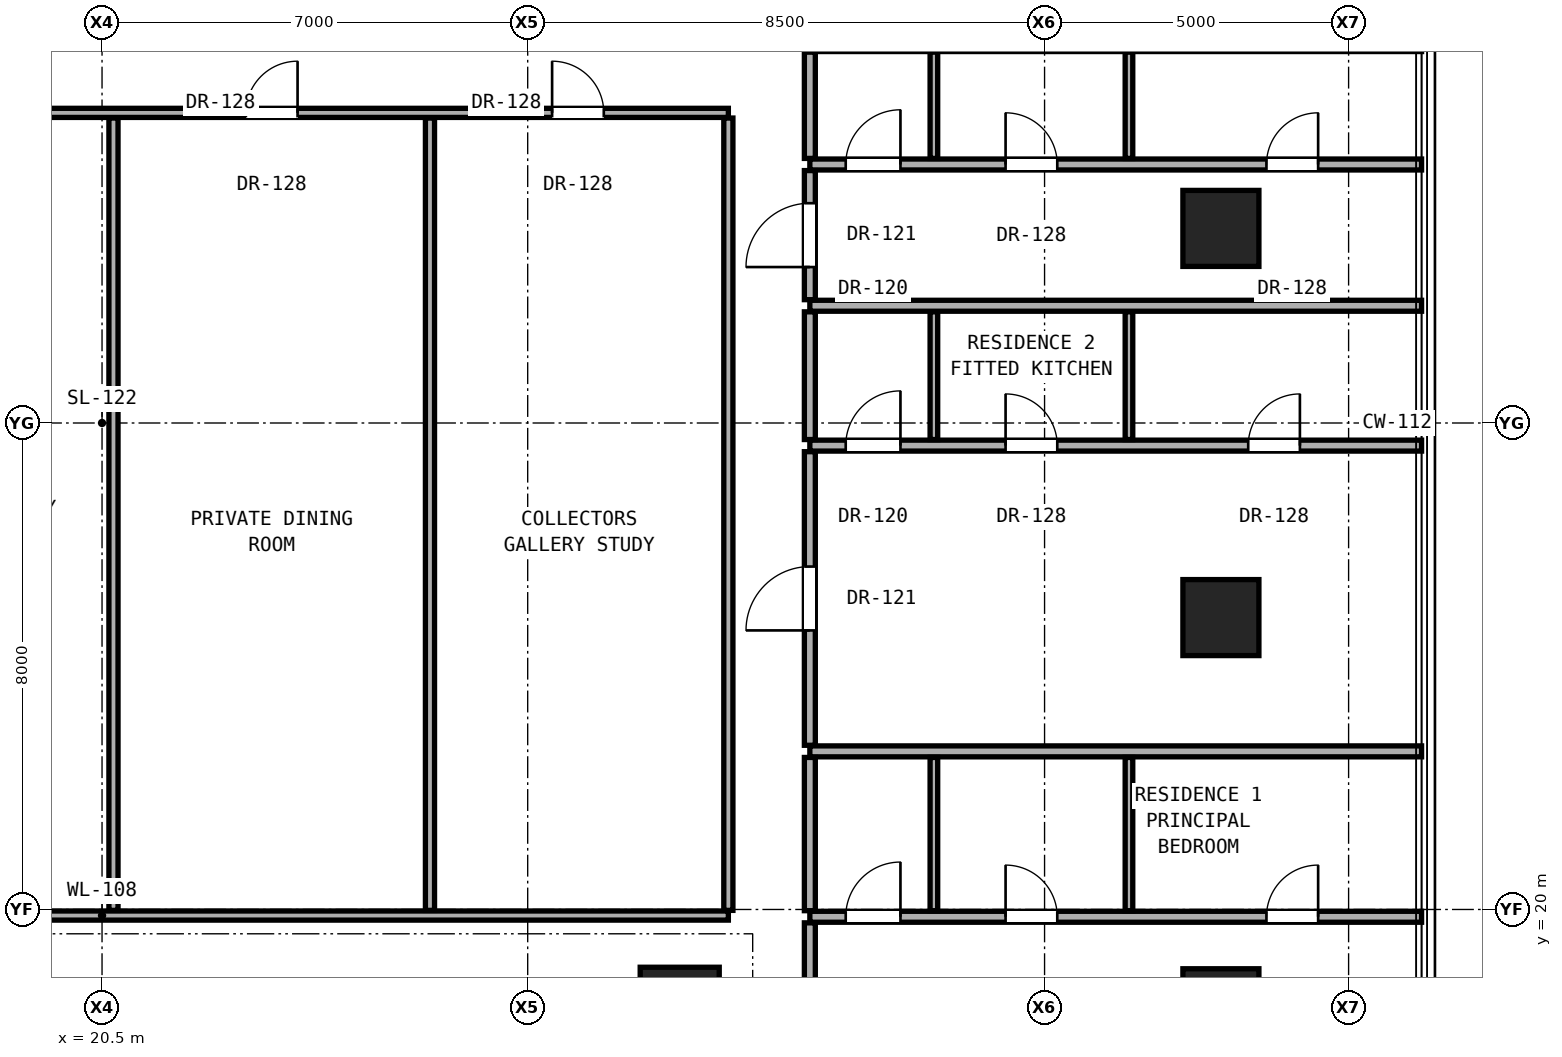
"""IFC4 building model, lengths in metres.
Left out: names, types, materials, properties, quantities, classifications, styles, units other than length and angle.
Written with IfcOpenShell. Run it as: python <this file> out.ifc"""

import sys

from ifc_helpers import new_model, si_unit, direction, frame, frame_2d, origin, origin_2d, place, context, subcontext, project, spatial, rectangle, hollow_rectangle, extrude, element, fill, save


model = new_model("IFC4")
c1 = context("Model", 3, precision=1e-05, world=origin(), true_north=direction((0.0, 1.0)))
c2 = subcontext(c1, "Body", "Model", "MODEL_VIEW")
j1 = project(units=[si_unit("LENGTHUNIT", "METRE"), si_unit("PLANEANGLEUNIT", "RADIAN")], contexts=[c1])
p1 = place(None, origin())
s1 = spatial("IfcSite", under=j1, at=p1, CompositionType="ELEMENT")
p2 = place(p1, origin())
s2 = spatial("IfcBuilding", under=s1, at=p2, CompositionType="ELEMENT")
p3 = place(p2, frame((0.0, 0.0, 65.3)))
s3 = spatial("IfcBuildingStorey", under=s2, at=p3, CompositionType="ELEMENT", Elevation=65.3)
p4 = place(p3, frame((30.0, 18.4, 0.0), z_axis=(0.0, 0.0, 1.0), x_axis=(1.0, 0.0, 0.0)))
e1 = element("IfcColumn", 1, at=p4, inside=s3, PredefinedType="COLUMN", context=c2, shape_type="SweptSolid", body=[
    extrude(rectangle(XDim=1.3, YDim=1.3, at=origin_2d()), origin(), (0.0, 0.0, 1.0), 3.3),
])
for number, where, z_axis, x_axis in (
    (2, (38.9, 18.4, 0.0), (0.0, 0.0, 1.0), (1.0, 0.0, 0.0)),
    (3, (38.9, 24.8, 0.0), (0.0, 0.0, 1.0), (1.0, 0.0, 0.0)),
    (4, (38.9, 31.2, 0.0), (0.0, 0.0, 1.0), (1.0, 0.0, 0.0)),
):
    element("IfcColumn", number, at=place(p3, frame(where, z_axis=z_axis, x_axis=x_axis)), inside=s3, PredefinedType="COLUMN", context=c2, shape_type="SweptSolid", body=[
        extrude(hollow_rectangle(XDim=1.25, YDim=1.25, WallThickness=0.07, at=origin_2d()), origin(), (0.0, 0.0, 1.0), 3.3),
    ])
p5 = place(p3, frame((10.2, 19.9, 0.0), z_axis=(0.0, 0.0, 1.0), x_axis=(1.0, 0.0, 0.0)))
e5 = element("IfcWall", 5, at=p5, inside=s3, PredefinedType="PARTITIONING", context=c2, shape_type="SweptSolid", body=[
    extrude(rectangle(XDim=20.6, YDim=0.15, at=frame_2d((10.3, 0.0))), origin(), (0.0, 0.0, 1.0), 2.104),
])
p6 = place(p5, frame((1.695, 0.0, 0.0)))
e6 = element("IfcOpeningElement", 6, at=p6, cuts=e5, PredefinedType="OPENING", context=c2, shape_type="SweptSolid", body=[
    extrude(rectangle(XDim=0.85, YDim=2.01, at=frame_2d((0.425, 1.005))), frame((0.0, 0.085, 0.0), z_axis=(0.0, -1.0, 0.0), x_axis=(1.0, 0.0, 0.0)), (0.0, 0.0, 1.0), 0.17),
])
p7 = place(p5, frame((3.94, 0.0, 0.0)))
e7 = element("IfcOpeningElement", 7, at=p7, cuts=e5, PredefinedType="OPENING", context=c2, shape_type="SweptSolid", body=[
    extrude(rectangle(XDim=0.85, YDim=2.01, at=frame_2d((0.425, 1.005))), frame((0.0, 0.085, 0.0), z_axis=(0.0, -1.0, 0.0), x_axis=(1.0, 0.0, 0.0)), (0.0, 0.0, 1.0), 0.17),
])
p8 = place(p5, frame((7.684, 0.0, 0.0)))
e8 = element("IfcOpeningElement", 8, at=p8, cuts=e5, PredefinedType="OPENING", context=c2, shape_type="SweptSolid", body=[
    extrude(rectangle(XDim=0.85, YDim=2.01, at=frame_2d((0.425, 1.005))), frame((0.0, 0.085, 0.0), z_axis=(0.0, -1.0, 0.0), x_axis=(1.0, 0.0, 0.0)), (0.0, 0.0, 1.0), 0.17),
])
p9 = place(p3, frame((32.14, 19.88, 0.0), z_axis=(0.0, 0.0, 1.0), x_axis=(1.0, 0.0, 0.0)))
e9 = element("IfcWall", 9, at=p9, inside=s3, PredefinedType="PARTITIONING", context=c2, shape_type="SweptSolid", body=[
    extrude(rectangle(XDim=10.06, YDim=0.18, at=frame_2d((5.03, 0.0))), origin(), (0.0, 0.0, 1.0), 2.125),
])
p10 = place(p9, frame((7.509, 0.0, 0.0)))
e10 = element("IfcOpeningElement", 10, at=p10, cuts=e9, PredefinedType="OPENING", context=c2, shape_type="SweptSolid", body=[
    extrude(rectangle(XDim=0.85, YDim=2.01, at=frame_2d((0.425, 1.005))), frame((0.0, 0.1, 0.0), z_axis=(0.0, -1.0, 0.0), x_axis=(1.0, 0.0, 0.0)), (0.0, 0.0, 1.0), 0.2),
])
p11 = place(p9, frame((3.219, 0.0, 0.0)))
e11 = element("IfcOpeningElement", 11, at=p11, cuts=e9, PredefinedType="OPENING", context=c2, shape_type="SweptSolid", body=[
    extrude(rectangle(XDim=0.85, YDim=2.01, at=frame_2d((0.425, 1.005))), frame((0.0, 0.1, 0.0), z_axis=(0.0, -1.0, 0.0), x_axis=(1.0, 0.0, 0.0)), (0.0, 0.0, 1.0), 0.2),
])
p12 = place(p9, frame((0.59, 0.0, 0.0)))
e12 = element("IfcOpeningElement", 12, at=p12, cuts=e9, PredefinedType="OPENING", context=c2, shape_type="SweptSolid", body=[
    extrude(rectangle(XDim=0.9, YDim=2.1, at=frame_2d((0.45, 1.05))), frame((0.0, 0.1, 0.0), z_axis=(0.0, -1.0, 0.0), x_axis=(1.0, 0.0, 0.0)), (0.0, 0.0, 1.0), 0.2),
])
p13 = place(p3, frame((32.14, 22.6, 0.0), z_axis=(0.0, 0.0, 1.0), x_axis=(1.0, 0.0, 0.0)))
e13 = element("IfcWall", 13, at=p13, inside=s3, PredefinedType="PARTITIONING", context=c2, shape_type="SweptSolid", body=[
    extrude(rectangle(XDim=10.06, YDim=0.18, at=frame_2d((5.03, 0.0))), origin(), (0.0, 0.0, 1.0), 2.125),
])
p14 = place(p3, frame((32.14, 27.628, 0.0), z_axis=(0.0, 0.0, 1.0), x_axis=(1.0, 0.0, 0.0)))
e14 = element("IfcWall", 14, at=p14, inside=s3, PredefinedType="PARTITIONING", context=c2, shape_type="SweptSolid", body=[
    extrude(rectangle(XDim=10.06, YDim=0.18, at=frame_2d((5.03, 0.0))), origin(), (0.0, 0.0, 1.0), 2.125),
])
p15 = place(p14, frame((7.209, 0.0, 0.0)))
e15 = element("IfcOpeningElement", 15, at=p15, cuts=e14, PredefinedType="OPENING", context=c2, shape_type="SweptSolid", body=[
    extrude(rectangle(XDim=0.85, YDim=2.01, at=frame_2d((0.425, 1.005))), frame((0.0, 0.1, 0.0), z_axis=(0.0, -1.0, 0.0), x_axis=(1.0, 0.0, 0.0)), (0.0, 0.0, 1.0), 0.2),
])
p16 = place(p14, frame((3.219, 0.0, 0.0)))
e16 = element("IfcOpeningElement", 16, at=p16, cuts=e14, PredefinedType="OPENING", context=c2, shape_type="SweptSolid", body=[
    extrude(rectangle(XDim=0.85, YDim=2.01, at=frame_2d((0.425, 1.005))), frame((0.0, 0.1, 0.0), z_axis=(0.0, -1.0, 0.0), x_axis=(1.0, 0.0, 0.0)), (0.0, 0.0, 1.0), 0.2),
])
p17 = place(p14, frame((0.59, 0.0, 0.0)))
e17 = element("IfcOpeningElement", 17, at=p17, cuts=e14, PredefinedType="OPENING", context=c2, shape_type="SweptSolid", body=[
    extrude(rectangle(XDim=0.9, YDim=2.1, at=frame_2d((0.45, 1.05))), frame((0.0, 0.1, 0.0), z_axis=(0.0, -1.0, 0.0), x_axis=(1.0, 0.0, 0.0)), (0.0, 0.0, 1.0), 0.2),
])
p18 = place(p3, frame((32.14, 29.928, 0.0), z_axis=(0.0, 0.0, 1.0), x_axis=(1.0, 0.0, 0.0)))
e18 = element("IfcWall", 18, at=p18, inside=s3, PredefinedType="PARTITIONING", context=c2, shape_type="SweptSolid", body=[
    extrude(rectangle(XDim=10.06, YDim=0.18, at=frame_2d((5.03, 0.0))), origin(), (0.0, 0.0, 1.0), 2.125),
])
p19 = place(p3, frame((32.14, 32.251, 0.0), z_axis=(0.0, 0.0, 1.0), x_axis=(1.0, 0.0, 0.0)))
e19 = element("IfcWall", 19, at=p19, inside=s3, PredefinedType="PARTITIONING", context=c2, shape_type="SweptSolid", body=[
    extrude(rectangle(XDim=10.06, YDim=0.18, at=frame_2d((5.03, 0.0))), origin(), (0.0, 0.0, 1.0), 2.125),
])
p20 = place(p19, frame((7.509, 0.0, 0.0)))
e20 = element("IfcOpeningElement", 20, at=p20, cuts=e19, PredefinedType="OPENING", context=c2, shape_type="SweptSolid", body=[
    extrude(rectangle(XDim=0.85, YDim=2.01, at=frame_2d((0.425, 1.005))), frame((0.0, 0.1, 0.0), z_axis=(0.0, -1.0, 0.0), x_axis=(1.0, 0.0, 0.0)), (0.0, 0.0, 1.0), 0.2),
])
p21 = place(p19, frame((3.219, 0.0, 0.0)))
e21 = element("IfcOpeningElement", 21, at=p21, cuts=e19, PredefinedType="OPENING", context=c2, shape_type="SweptSolid", body=[
    extrude(rectangle(XDim=0.85, YDim=2.01, at=frame_2d((0.425, 1.005))), frame((0.0, 0.1, 0.0), z_axis=(0.0, -1.0, 0.0), x_axis=(1.0, 0.0, 0.0)), (0.0, 0.0, 1.0), 0.2),
])
p22 = place(p19, frame((0.59, 0.0, 0.0)))
e22 = element("IfcOpeningElement", 22, at=p22, cuts=e19, PredefinedType="OPENING", context=c2, shape_type="SweptSolid", body=[
    extrude(rectangle(XDim=0.9, YDim=2.1, at=frame_2d((0.45, 1.05))), frame((0.0, 0.1, 0.0), z_axis=(0.0, -1.0, 0.0), x_axis=(1.0, 0.0, 0.0)), (0.0, 0.0, 1.0), 0.2),
])
p23 = place(p3, frame((10.2, 33.1, 0.0), z_axis=(0.0, 0.0, 1.0), x_axis=(1.0, 0.0, 0.0)))
e23 = element("IfcWall", 23, at=p23, inside=s3, PredefinedType="PARTITIONING", context=c2, shape_type="SweptSolid", body=[
    extrude(rectangle(XDim=20.6, YDim=0.15, at=frame_2d((10.3, 0.0))), origin(), (0.0, 0.0, 1.0), 2.104),
])
p24 = place(p23, frame((12.666, 0.0, 0.0)))
e24 = element("IfcOpeningElement", 24, at=p24, cuts=e23, PredefinedType="OPENING", context=c2, shape_type="SweptSolid", body=[
    extrude(rectangle(XDim=0.85, YDim=2.01, at=frame_2d((0.425, 1.005))), frame((0.0, 0.085, 0.0), z_axis=(0.0, -1.0, 0.0), x_axis=(1.0, 0.0, 0.0)), (0.0, 0.0, 1.0), 0.17),
])
p25 = place(p23, frame((17.701, 0.0, 0.0)))
e25 = element("IfcOpeningElement", 25, at=p25, cuts=e23, PredefinedType="OPENING", context=c2, shape_type="SweptSolid", body=[
    extrude(rectangle(XDim=0.85, YDim=2.01, at=frame_2d((0.425, 1.005))), frame((0.0, 0.085, 0.0), z_axis=(0.0, -1.0, 0.0), x_axis=(1.0, 0.0, 0.0)), (0.0, 0.0, 1.0), 0.17),
])
for number, where, z_axis, x_axis in (
    (26, (20.688, 19.985, 0.0), (0.0, 0.0, 1.0), (0.0, 1.0, 0.0)),
    (27, (25.893, 19.985, 0.0), (0.0, 0.0, 1.0), (0.0, 1.0, 0.0)),
):
    element("IfcWall", number, at=place(p3, frame(where, z_axis=z_axis, x_axis=x_axis)), inside=s3, PredefinedType="PARTITIONING", context=c2, shape_type="SweptSolid", body=[
        extrude(rectangle(XDim=13.03, YDim=0.15, at=frame_2d((6.515, 0.0))), origin(), (0.0, 0.0, 1.0), 2.104),
    ])
p26 = place(p3, frame((30.8, 19.985, 0.0), z_axis=(0.0, 0.0, 1.0), x_axis=(0.0, 1.0, 0.0)))
e28 = element("IfcWall", 28, at=p26, inside=s3, PredefinedType="PARTITIONING", context=c2, shape_type="SweptSolid", body=[
    extrude(rectangle(XDim=13.03, YDim=0.15, at=frame_2d((6.515, 0.0))), origin(), (0.0, 0.0, 1.0), 2.279),
])
p27 = place(p3, frame((32.14, 14.308, 0.0), z_axis=(0.0, 0.0, 1.0), x_axis=(0.0, 1.0, 0.0)))
e29 = element("IfcWall", 29, at=p27, inside=s3, PredefinedType="PARTITIONING", context=c2, shape_type="SweptSolid", body=[
    extrude(rectangle(XDim=5.472, YDim=0.18, at=frame_2d((2.736, 0.0))), origin(), (0.0, 0.0, 1.0), 2.436),
])
p28 = place(p27, frame((2.511, 0.0, 0.0)))
e30 = element("IfcOpeningElement", 30, at=p28, cuts=e29, PredefinedType="OPENING", context=c2, shape_type="SweptSolid", body=[
    extrude(rectangle(XDim=1.05, YDim=2.2, at=frame_2d((0.525, 1.1))), frame((0.0, 0.1, 0.0), z_axis=(0.0, -1.0, 0.0), x_axis=(1.0, 0.0, 0.0)), (0.0, 0.0, 1.0), 0.2),
])
p29 = place(p3, frame((32.14, 19.98, 0.0), z_axis=(0.0, 0.0, 1.0), x_axis=(0.0, 1.0, 0.0)))
e31 = element("IfcWall", 31, at=p29, inside=s3, PredefinedType="PARTITIONING", context=c2, shape_type="SweptSolid", body=[
    extrude(rectangle(XDim=2.52, YDim=0.18, at=frame_2d((1.26, 0.0))), origin(), (0.0, 0.0, 1.0), 3.06),
])
p30 = place(p3, frame((32.14, 22.7, 0.0), z_axis=(0.0, 0.0, 1.0), x_axis=(0.0, 1.0, 0.0)))
e32 = element("IfcWall", 32, at=p30, inside=s3, PredefinedType="PARTITIONING", context=c2, shape_type="SweptSolid", body=[
    extrude(rectangle(XDim=4.828, YDim=0.18, at=frame_2d((2.414, 0.0))), origin(), (0.0, 0.0, 1.0), 2.279),
])
p31 = place(p30, frame((1.889, 0.0, 0.0)))
e33 = element("IfcOpeningElement", 33, at=p31, cuts=e32, PredefinedType="OPENING", context=c2, shape_type="SweptSolid", body=[
    extrude(rectangle(XDim=1.05, YDim=2.2, at=frame_2d((0.525, 1.1))), frame((0.0, 0.1, 0.0), z_axis=(0.0, -1.0, 0.0), x_axis=(1.0, 0.0, 0.0)), (0.0, 0.0, 1.0), 0.2),
])
p32 = place(p3, frame((32.14, 27.728, 0.0), z_axis=(0.0, 0.0, 1.0), x_axis=(0.0, 1.0, 0.0)))
e34 = element("IfcWall", 34, at=p32, inside=s3, PredefinedType="PARTITIONING", context=c2, shape_type="SweptSolid", body=[
    extrude(rectangle(XDim=2.1, YDim=0.18, at=frame_2d((1.05, 0.0))), origin(), (0.0, 0.0, 1.0), 3.06),
])
p33 = place(p3, frame((32.14, 30.028, 0.0), z_axis=(0.0, 0.0, 1.0), x_axis=(0.0, 1.0, 0.0)))
e35 = element("IfcWall", 35, at=p33, inside=s3, PredefinedType="PARTITIONING", context=c2, shape_type="SweptSolid", body=[
    extrude(rectangle(XDim=2.123, YDim=0.18, at=frame_2d((1.062, 0.0))), origin(), (0.0, 0.0, 1.0), 2.279),
])
p34 = place(p33, frame((0.537, 0.0, 0.0)))
e36 = element("IfcOpeningElement", 36, at=p34, cuts=e35, PredefinedType="OPENING", context=c2, shape_type="SweptSolid", body=[
    extrude(rectangle(XDim=1.05, YDim=2.2, at=frame_2d((0.525, 1.1))), frame((0.0, 0.1, 0.0), z_axis=(0.0, -1.0, 0.0), x_axis=(1.0, 0.0, 0.0)), (0.0, 0.0, 1.0), 0.2),
])
p35 = place(p3, frame((32.14, 32.351, 0.0), z_axis=(0.0, 0.0, 1.0), x_axis=(0.0, 1.0, 0.0)))
e37 = element("IfcWall", 37, at=p35, inside=s3, PredefinedType="PARTITIONING", context=c2, shape_type="SweptSolid", body=[
    extrude(rectangle(XDim=1.747, YDim=0.18, at=frame_2d((0.874, 0.0))), origin(), (0.0, 0.0, 1.0), 3.06),
])
p36 = place(p3, frame((34.18, 19.98, 0.0), z_axis=(0.0, 0.0, 1.0), x_axis=(0.0, 1.0, 0.0)))
e38 = element("IfcWall", 38, at=p36, inside=s3, PredefinedType="PARTITIONING", context=c2, shape_type="SweptSolid", body=[
    extrude(rectangle(XDim=2.52, YDim=0.125, at=frame_2d((1.26, 0.0))), origin(), (0.0, 0.0, 1.0), 3.06),
])
p37 = place(p3, frame((34.18, 27.728, 0.0), z_axis=(0.0, 0.0, 1.0), x_axis=(0.0, 1.0, 0.0)))
e39 = element("IfcWall", 39, at=p37, inside=s3, PredefinedType="PARTITIONING", context=c2, shape_type="SweptSolid", body=[
    extrude(rectangle(XDim=2.1, YDim=0.125, at=frame_2d((1.05, 0.0))), origin(), (0.0, 0.0, 1.0), 3.06),
])
p38 = place(p3, frame((34.18, 32.351, 0.0), z_axis=(0.0, 0.0, 1.0), x_axis=(0.0, 1.0, 0.0)))
e40 = element("IfcWall", 40, at=p38, inside=s3, PredefinedType="PARTITIONING", context=c2, shape_type="SweptSolid", body=[
    extrude(rectangle(XDim=1.747, YDim=0.125, at=frame_2d((0.874, 0.0))), origin(), (0.0, 0.0, 1.0), 3.06),
])
p39 = place(p3, frame((37.388, 19.98, 0.0), z_axis=(0.0, 0.0, 1.0), x_axis=(0.0, 1.0, 0.0)))
e41 = element("IfcWall", 41, at=p39, inside=s3, PredefinedType="PARTITIONING", context=c2, shape_type="SweptSolid", body=[
    extrude(rectangle(XDim=2.52, YDim=0.125, at=frame_2d((1.26, 0.0))), origin(), (0.0, 0.0, 1.0), 3.06),
])
p40 = place(p3, frame((37.388, 27.728, 0.0), z_axis=(0.0, 0.0, 1.0), x_axis=(0.0, 1.0, 0.0)))
e42 = element("IfcWall", 42, at=p40, inside=s3, PredefinedType="PARTITIONING", context=c2, shape_type="SweptSolid", body=[
    extrude(rectangle(XDim=2.1, YDim=0.125, at=frame_2d((1.05, 0.0))), origin(), (0.0, 0.0, 1.0), 3.06),
])
p41 = place(p3, frame((37.388, 32.351, 0.0), z_axis=(0.0, 0.0, 1.0), x_axis=(0.0, 1.0, 0.0)))
e43 = element("IfcWall", 43, at=p41, inside=s3, PredefinedType="PARTITIONING", context=c2, shape_type="SweptSolid", body=[
    extrude(rectangle(XDim=1.747, YDim=0.125, at=frame_2d((0.874, 0.0))), origin(), (0.0, 0.0, 1.0), 3.06),
])
p42 = place(p10, origin())
e44 = element("IfcDoor", 44, at=p42, inside=s3, OperationType="SINGLE_SWING_RIGHT", PredefinedType="DOOR", context=c2, shape_type="SweptSolid", body=[
    extrude(rectangle(XDim=0.85, YDim=2.01, at=frame_2d((0.425, 1.005))), frame((0.0, 0.025, 0.0), z_axis=(0.0, -1.0, 0.0), x_axis=(1.0, 0.0, 0.0)), (0.0, 0.0, 1.0), 0.05),
])
fill(e10, e44)
p43 = place(p11, origin())
e45 = element("IfcDoor", 45, at=p43, inside=s3, OperationType="SINGLE_SWING_LEFT", PredefinedType="DOOR", context=c2, shape_type="SweptSolid", body=[
    extrude(rectangle(XDim=0.85, YDim=2.01, at=frame_2d((0.425, 1.005))), frame((0.0, 0.025, 0.0), z_axis=(0.0, -1.0, 0.0), x_axis=(1.0, 0.0, 0.0)), (0.0, 0.0, 1.0), 0.05),
])
fill(e11, e45)
p44 = place(p12, origin())
e46 = element("IfcDoor", 46, at=p44, inside=s3, OperationType="SINGLE_SWING_RIGHT", PredefinedType="DOOR", context=c2, shape_type="SweptSolid", body=[
    extrude(rectangle(XDim=0.9, YDim=2.1, at=frame_2d((0.45, 1.05))), frame((0.0, 0.025, 0.0), z_axis=(0.0, -1.0, 0.0), x_axis=(1.0, 0.0, 0.0)), (0.0, 0.0, 1.0), 0.05),
])
fill(e12, e46)
p45 = place(p31, origin())
e47 = element("IfcDoor", 47, at=p45, inside=s3, OperationType="SINGLE_SWING_LEFT", PredefinedType="DOOR", context=c2, shape_type="SweptSolid", body=[
    extrude(rectangle(XDim=1.05, YDim=2.2, at=frame_2d((0.525, 1.1))), frame((0.0, 0.025, 0.0), z_axis=(0.0, -1.0, 0.0), x_axis=(1.0, 0.0, 0.0)), (0.0, 0.0, 1.0), 0.05),
])
fill(e33, e47)
p46 = place(p15, origin())
e48 = element("IfcDoor", 48, at=p46, inside=s3, OperationType="SINGLE_SWING_RIGHT", PredefinedType="DOOR", context=c2, shape_type="SweptSolid", body=[
    extrude(rectangle(XDim=0.85, YDim=2.01, at=frame_2d((0.425, 1.005))), frame((0.0, 0.025, 0.0), z_axis=(0.0, -1.0, 0.0), x_axis=(1.0, 0.0, 0.0)), (0.0, 0.0, 1.0), 0.05),
])
fill(e15, e48)
p47 = place(p16, origin())
e49 = element("IfcDoor", 49, at=p47, inside=s3, OperationType="SINGLE_SWING_LEFT", PredefinedType="DOOR", context=c2, shape_type="SweptSolid", body=[
    extrude(rectangle(XDim=0.85, YDim=2.01, at=frame_2d((0.425, 1.005))), frame((0.0, 0.025, 0.0), z_axis=(0.0, -1.0, 0.0), x_axis=(1.0, 0.0, 0.0)), (0.0, 0.0, 1.0), 0.05),
])
fill(e16, e49)
p48 = place(p17, origin())
e50 = element("IfcDoor", 50, at=p48, inside=s3, OperationType="SINGLE_SWING_RIGHT", PredefinedType="DOOR", context=c2, shape_type="SweptSolid", body=[
    extrude(rectangle(XDim=0.9, YDim=2.1, at=frame_2d((0.45, 1.05))), frame((0.0, 0.025, 0.0), z_axis=(0.0, -1.0, 0.0), x_axis=(1.0, 0.0, 0.0)), (0.0, 0.0, 1.0), 0.05),
])
fill(e17, e50)
p49 = place(p34, origin())
e51 = element("IfcDoor", 51, at=p49, inside=s3, OperationType="SINGLE_SWING_LEFT", PredefinedType="DOOR", context=c2, shape_type="SweptSolid", body=[
    extrude(rectangle(XDim=1.05, YDim=2.2, at=frame_2d((0.525, 1.1))), frame((0.0, 0.025, 0.0), z_axis=(0.0, -1.0, 0.0), x_axis=(1.0, 0.0, 0.0)), (0.0, 0.0, 1.0), 0.05),
])
fill(e36, e51)
p50 = place(p20, origin())
e52 = element("IfcDoor", 52, at=p50, inside=s3, OperationType="SINGLE_SWING_RIGHT", PredefinedType="DOOR", context=c2, shape_type="SweptSolid", body=[
    extrude(rectangle(XDim=0.85, YDim=2.01, at=frame_2d((0.425, 1.005))), frame((0.0, 0.025, 0.0), z_axis=(0.0, -1.0, 0.0), x_axis=(1.0, 0.0, 0.0)), (0.0, 0.0, 1.0), 0.05),
])
fill(e20, e52)
p51 = place(p21, origin())
e53 = element("IfcDoor", 53, at=p51, inside=s3, OperationType="SINGLE_SWING_LEFT", PredefinedType="DOOR", context=c2, shape_type="SweptSolid", body=[
    extrude(rectangle(XDim=0.85, YDim=2.01, at=frame_2d((0.425, 1.005))), frame((0.0, 0.025, 0.0), z_axis=(0.0, -1.0, 0.0), x_axis=(1.0, 0.0, 0.0)), (0.0, 0.0, 1.0), 0.05),
])
fill(e21, e53)
p52 = place(p22, origin())
e54 = element("IfcDoor", 54, at=p52, inside=s3, OperationType="SINGLE_SWING_RIGHT", PredefinedType="DOOR", context=c2, shape_type="SweptSolid", body=[
    extrude(rectangle(XDim=0.9, YDim=2.1, at=frame_2d((0.45, 1.05))), frame((0.0, 0.025, 0.0), z_axis=(0.0, -1.0, 0.0), x_axis=(1.0, 0.0, 0.0)), (0.0, 0.0, 1.0), 0.05),
])
fill(e22, e54)
p53 = place(p24, origin())
e55 = element("IfcDoor", 55, at=p53, inside=s3, OperationType="SINGLE_SWING_RIGHT", PredefinedType="DOOR", context=c2, shape_type="SweptSolid", body=[
    extrude(rectangle(XDim=0.85, YDim=2.01, at=frame_2d((0.425, 1.005))), frame((0.0, 0.025, 0.0), z_axis=(0.0, -1.0, 0.0), x_axis=(1.0, 0.0, 0.0)), (0.0, 0.0, 1.0), 0.05),
])
fill(e24, e55)
p54 = place(p25, origin())
e56 = element("IfcDoor", 56, at=p54, inside=s3, OperationType="SINGLE_SWING_LEFT", PredefinedType="DOOR", context=c2, shape_type="SweptSolid", body=[
    extrude(rectangle(XDim=0.85, YDim=2.01, at=frame_2d((0.425, 1.005))), frame((0.0, 0.025, 0.0), z_axis=(0.0, -1.0, 0.0), x_axis=(1.0, 0.0, 0.0)), (0.0, 0.0, 1.0), 0.05),
])
fill(e25, e56)
save(model, sys.argv[1])
